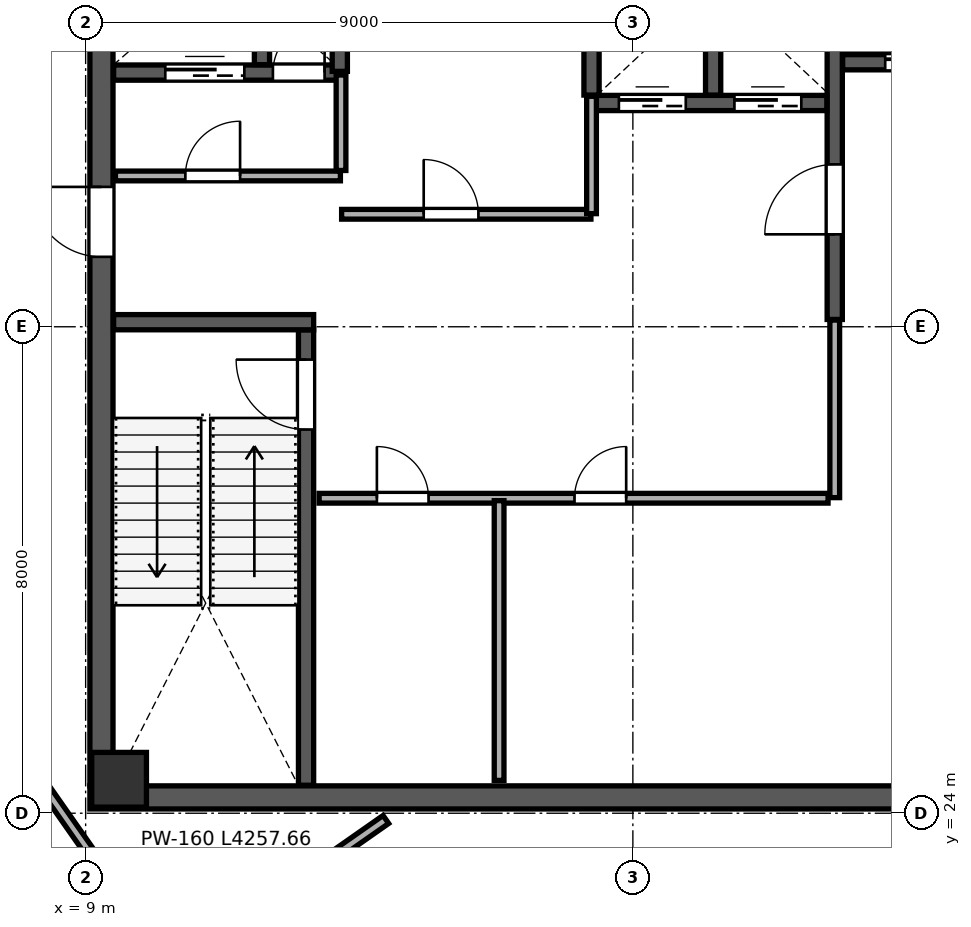
"""IFC4 building model, lengths in metres.
Left out: names, types, materials, properties, quantities, classifications, styles, units other than length and angle.
Written with IfcOpenShell. Run it as: python <this file> out.ifc"""

import sys

from ifc_helpers import new_model, si_unit, direction, frame, frame_2d, origin, origin_2d, place, context, subcontext, project, spatial, rectangle, extrude, source, transform, mapped, element, fill, save


model = new_model("IFC4")
c1 = context("Model", 3, precision=1e-05, world=origin(), true_north=direction((0.0, 1.0)))
c2 = subcontext(c1, "Body", "Model", "MODEL_VIEW")
j1 = project(units=[si_unit("LENGTHUNIT", "METRE"), si_unit("PLANEANGLEUNIT", "RADIAN")], contexts=[c1])
p1 = place(None, origin())
s1 = spatial("IfcSite", under=j1, at=p1, CompositionType="ELEMENT")
p2 = place(p1, origin())
s2 = spatial("IfcBuilding", under=s1, at=p2, CompositionType="ELEMENT")
p3 = place(p2, frame((0.0, 0.0, 298.8)))
s3 = spatial("IfcBuildingStorey", under=s2, at=p3, CompositionType="ELEMENT", Elevation=298.8)
m1 = source(origin(), c2, "Body", "SweptSolid", [
    extrude(rectangle(XDim=0.9, YDim=0.9, at=origin_2d()), origin(), (0.0, 0.0, 1.0), 4.198),
])
p4 = place(p3, frame((9.55, 24.55, 0.001), z_axis=(0.0, 0.0, 1.0), x_axis=(1.0, 0.0, 0.0)))
e1 = element("IfcColumn", 1, at=p4, inside=s3, PredefinedType="COLUMN", context=c2, shape_type="MappedRepresentation", body=[
    mapped(m1, transform((0.0, 0.0, 0.0), scale=1.0)),
])
p5 = place(p3, frame((9.26, 24.45, 0.0), z_axis=(0.0, 0.0, 1.0), x_axis=(0.0, 1.0, 0.0)))
e2 = element("IfcWall", 2, at=p5, inside=s3, PredefinedType="SHEAR", context=c2, shape_type="SweptSolid", body=[
    extrude(rectangle(XDim=15.1, YDim=0.38, at=frame_2d((7.55, 0.0))), origin(), (0.0, 0.0, 1.0), 3.96),
])
p6 = place(p5, frame((8.7, 0.0, 0.0)))
e3 = element("IfcOpeningElement", 3, at=p6, cuts=e2, PredefinedType="OPENING", context=c2, shape_type="SweptSolid", body=[
    extrude(rectangle(XDim=1.15, YDim=2.2, at=frame_2d((0.575, 1.1))), frame((0.0, 0.2, 0.0), z_axis=(0.0, -1.0, 0.0), x_axis=(1.0, 0.0, 0.0)), (0.0, 0.0, 1.0), 0.4),
])
p7 = place(p3, frame((9.07, 24.26, 0.0), z_axis=(0.0, 0.0, 1.0), x_axis=(1.0, 0.0, 0.0)))
e4 = element("IfcWall", 4, at=p7, inside=s3, PredefinedType="SHEAR", context=c2, shape_type="SweptSolid", body=[
    extrude(rectangle(XDim=17.86, YDim=0.38, at=frame_2d((8.93, 0.0))), origin(), (0.0, 0.0, 1.0), 3.96),
])
p8 = place(p3, frame((12.625, 24.46, 0.0), z_axis=(0.0, 0.0, 1.0), x_axis=(0.0, 1.0, 0.0)))
e5 = element("IfcWall", 5, at=p8, inside=s3, PredefinedType="SHEAR", context=c2, shape_type="SweptSolid", body=[
    extrude(rectangle(XDim=7.49, YDim=0.25, at=frame_2d((3.745, 0.0))), origin(), (0.0, 0.0, 1.0), 3.96),
])
p9 = place(p8, frame((5.85, 0.0, 0.0)))
e6 = element("IfcOpeningElement", 6, at=p9, cuts=e5, PredefinedType="OPENING", context=c2, shape_type="SweptSolid", body=[
    extrude(rectangle(XDim=1.15, YDim=2.2, at=frame_2d((0.575, 1.1))), frame((0.0, 0.135, 0.0), z_axis=(0.0, -1.0, 0.0), x_axis=(1.0, 0.0, 0.0)), (0.0, 0.0, 1.0), 0.27),
])
p10 = place(p3, frame((9.46, 32.075, 0.0), z_axis=(0.0, 0.0, 1.0), x_axis=(1.0, 0.0, 0.0)))
e7 = element("IfcWall", 7, at=p10, inside=s3, PredefinedType="SHEAR", context=c2, shape_type="SweptSolid", body=[
    extrude(rectangle(XDim=3.29, YDim=0.25, at=frame_2d((1.645, 0.0))), origin(), (0.0, 0.0, 1.0), 3.96),
])
p11 = place(p3, frame((21.32, 32.12, 0.0), z_axis=(0.0, 0.0, 1.0), x_axis=(0.0, 1.0, 0.0)))
e8 = element("IfcWall", 8, at=p11, inside=s3, PredefinedType="SHEAR", context=c2, shape_type="SweptSolid", body=[
    extrude(rectangle(XDim=7.42, YDim=0.25, at=frame_2d((3.71, 0.0))), origin(), (0.0, 0.0, 1.0), 3.96),
])
p12 = place(p11, frame((1.4, 0.0, 0.0)))
e9 = element("IfcOpeningElement", 9, at=p12, cuts=e8, PredefinedType="OPENING", context=c2, shape_type="SweptSolid", body=[
    extrude(rectangle(XDim=1.15, YDim=2.2, at=frame_2d((0.575, 1.1))), frame((0.0, 0.135, 0.0), z_axis=(0.0, -1.0, 0.0), x_axis=(1.0, 0.0, 0.0)), (0.0, 0.0, 1.0), 0.27),
])
p13 = place(p3, frame((9.46, 36.18, 0.0), z_axis=(0.0, 0.0, 1.0), x_axis=(1.0, 0.0, 0.0)))
e10 = element("IfcWall", 10, at=p13, inside=s3, PredefinedType="SHEAR", context=c2, shape_type="SweptSolid", body=[
    extrude(rectangle(XDim=3.79, YDim=0.25, at=frame_2d((1.895, 0.0))), origin(), (0.0, 0.0, 1.0), 3.96),
])
p14 = place(p13, frame((2.62, 0.0, 0.0)))
e11 = element("IfcOpeningElement", 11, at=p14, cuts=e10, PredefinedType="OPENING", context=c2, shape_type="SweptSolid", body=[
    extrude(rectangle(XDim=0.85, YDim=2.1, at=frame_2d((0.425, 1.05))), frame((0.0, 0.135, 0.0), z_axis=(0.0, -1.0, 0.0), x_axis=(1.0, 0.0, 0.0)), (0.0, 0.0, 1.0), 0.27),
])
p15 = place(p13, frame((0.85, 0.0, 0.0)))
e12 = element("IfcOpeningElement", 12, at=p15, cuts=e10, PredefinedType="OPENING", context=c2, shape_type="SweptSolid", body=[
    extrude(rectangle(XDim=1.3, YDim=2.25, at=frame_2d((0.65, 1.125))), frame((0.0, 0.135, 0.0), z_axis=(0.0, -1.0, 0.0), x_axis=(1.0, 0.0, 0.0)), (0.0, 0.0, 1.0), 0.27),
])
p16 = place(p3, frame((11.9, 36.31, 0.0), z_axis=(0.0, 0.0, 1.0), x_axis=(0.0, 1.0, 0.0)))
e13 = element("IfcWall", 13, at=p16, inside=s3, PredefinedType="SHEAR", context=c2, shape_type="SweptSolid", body=[
    extrude(rectangle(XDim=3.23, YDim=0.25, at=frame_2d((1.615, 0.0))), origin(), (0.0, 0.0, 1.0), 3.96),
])
p17 = place(p3, frame((21.45, 36.35, 0.0), z_axis=(0.0, 0.0, 1.0), x_axis=(1.0, 0.0, 0.0)))
e14 = element("IfcWall", 14, at=p17, inside=s3, PredefinedType="SHEAR", context=c2, shape_type="SweptSolid", body=[
    extrude(rectangle(XDim=5.09, YDim=0.25, at=frame_2d((2.545, 0.0))), origin(), (0.0, 0.0, 1.0), 3.96),
])
p18 = place(p17, frame((0.7, 0.0, 0.0)))
e15 = element("IfcOpeningElement", 15, at=p18, cuts=e14, PredefinedType="OPENING", context=c2, shape_type="SweptSolid", body=[
    extrude(rectangle(XDim=1.2, YDim=2.2, at=frame_2d((0.6, 1.1))), frame((0.0, 0.135, 0.0), z_axis=(0.0, -1.0, 0.0), x_axis=(1.0, 0.0, 0.0)), (0.0, 0.0, 1.0), 0.27),
])
p19 = place(p17, frame((3.25, 0.0, 0.0)))
e16 = element("IfcOpeningElement", 16, at=p19, cuts=e14, PredefinedType="OPENING", context=c2, shape_type="SweptSolid", body=[
    extrude(rectangle(XDim=1.2, YDim=2.2, at=frame_2d((0.6, 1.1))), frame((0.0, 0.135, 0.0), z_axis=(0.0, -1.0, 0.0), x_axis=(1.0, 0.0, 0.0)), (0.0, 0.0, 1.0), 0.27),
])
p20 = place(p3, frame((13.18, 36.2, 0.0), z_axis=(0.0, 0.0, 1.0), x_axis=(0.0, 1.0, 0.0)))
e17 = element("IfcWall", 17, at=p20, inside=s3, PredefinedType="SHEAR", context=c2, shape_type="SweptSolid", body=[
    extrude(rectangle(XDim=3.34, YDim=0.25, at=frame_2d((1.67, 0.0))), origin(), (0.0, 0.0, 1.0), 3.96),
])
p21 = place(p3, frame((17.32, 35.68, 0.0), z_axis=(0.0, 0.0, 1.0), x_axis=(1.0, 0.0, 0.0)))
e18 = element("IfcWall", 18, at=p21, inside=s3, PredefinedType="SHEAR", context=c2, shape_type="SweptSolid", body=[
    extrude(rectangle(XDim=3.87, YDim=0.25, at=frame_2d((1.935, 0.0))), origin(), (0.0, 0.0, 1.0), 3.96),
])
p22 = place(p21, frame((0.45, 0.0, 0.0)))
e19 = element("IfcOpeningElement", 19, at=p22, cuts=e18, PredefinedType="OPENING", context=c2, shape_type="SweptSolid", body=[
    extrude(rectangle(XDim=1.1, YDim=2.2, at=frame_2d((0.55, 1.1))), frame((0.0, 0.135, 0.0), z_axis=(0.0, -1.0, 0.0), x_axis=(1.0, 0.0, 0.0)), (0.0, 0.0, 1.0), 0.27),
])
p23 = place(p21, frame((2.35, 0.0, 0.0)))
e20 = element("IfcOpeningElement", 20, at=p23, cuts=e18, PredefinedType="OPENING", context=c2, shape_type="SweptSolid", body=[
    extrude(rectangle(XDim=1.1, YDim=2.2, at=frame_2d((0.55, 1.1))), frame((0.0, 0.135, 0.0), z_axis=(0.0, -1.0, 0.0), x_axis=(1.0, 0.0, 0.0)), (0.0, 0.0, 1.0), 0.27),
])
for number, where, z_axis, x_axis in (
    (21, (17.32, 35.81, 0.0), (0.0, 0.0, 1.0), (0.0, 1.0, 0.0)),
    (22, (19.32, 35.81, 0.0), (0.0, 0.0, 1.0), (0.0, 1.0, 0.0)),
):
    element("IfcWall", number, at=place(p3, frame(where, z_axis=z_axis, x_axis=x_axis)), inside=s3, PredefinedType="SHEAR", context=c2, shape_type="SweptSolid", body=[
        extrude(rectangle(XDim=3.73, YDim=0.25, at=frame_2d((1.865, 0.0))), origin(), (0.0, 0.0, 1.0), 3.96),
    ])
p24 = place(p3, frame((9.49, 34.48, 0.0), z_axis=(0.0, 0.0, 1.0), x_axis=(1.0, 0.0, 0.0)))
e23 = element("IfcWall", 23, at=p24, inside=s3, PredefinedType="PARTITIONING", context=c2, shape_type="SweptSolid", body=[
    extrude(rectangle(XDim=3.7, YDim=0.16, at=frame_2d((1.85, 0.0))), origin(), (0.0, 0.0, 1.0), 3.96),
])
p25 = place(p24, frame((1.15, 0.0, 0.0)))
e24 = element("IfcOpeningElement", 24, at=p25, cuts=e23, PredefinedType="OPENING", context=c2, shape_type="SweptSolid", body=[
    extrude(rectangle(XDim=0.9, YDim=2.15, at=frame_2d((0.45, 1.075))), frame((0.0, 0.09, 0.0), z_axis=(0.0, -1.0, 0.0), x_axis=(1.0, 0.0, 0.0)), (0.0, 0.0, 1.0), 0.18),
])
p26 = place(p3, frame((13.2, 34.57, 0.0), z_axis=(0.0, 0.0, 1.0), x_axis=(0.0, 1.0, 0.0)))
e25 = element("IfcWall", 25, at=p26, inside=s3, PredefinedType="PARTITIONING", context=c2, shape_type="SweptSolid", body=[
    extrude(rectangle(XDim=1.57, YDim=0.16, at=frame_2d((0.785, 0.0))), origin(), (0.0, 0.0, 1.0), 3.96),
])
p27 = place(p3, frame((13.21, 33.85, 0.0), z_axis=(0.0, 0.0, 1.0), x_axis=(1.0, 0.0, 0.0)))
e26 = element("IfcWall", 26, at=p27, inside=s3, PredefinedType="PARTITIONING", context=c2, shape_type="SweptSolid", body=[
    extrude(rectangle(XDim=4.1, YDim=0.16, at=frame_2d((2.05, 0.0))), origin(), (0.0, 0.0, 1.0), 3.96),
])
p28 = place(p27, frame((1.35, 0.0, 0.0)))
e27 = element("IfcOpeningElement", 27, at=p28, cuts=e26, PredefinedType="OPENING", context=c2, shape_type="SweptSolid", body=[
    extrude(rectangle(XDim=0.9, YDim=2.15, at=frame_2d((0.45, 1.075))), frame((0.0, 0.09, 0.0), z_axis=(0.0, -1.0, 0.0), x_axis=(1.0, 0.0, 0.0)), (0.0, 0.0, 1.0), 0.18),
])
p29 = place(p3, frame((17.32, 33.86, 0.0), z_axis=(0.0, 0.0, 1.0), x_axis=(0.0, 1.0, 0.0)))
e28 = element("IfcWall", 28, at=p29, inside=s3, PredefinedType="PARTITIONING", context=c2, shape_type="SweptSolid", body=[
    extrude(rectangle(XDim=1.93, YDim=0.16, at=frame_2d((0.965, 0.0))), origin(), (0.0, 0.0, 1.0), 3.96),
])
p30 = place(p3, frame((12.84, 29.18, 0.0), z_axis=(0.0, 0.0, 1.0), x_axis=(1.0, 0.0, 0.0)))
e29 = element("IfcWall", 29, at=p30, inside=s3, PredefinedType="PARTITIONING", context=c2, shape_type="SweptSolid", body=[
    extrude(rectangle(XDim=8.37, YDim=0.16, at=frame_2d((4.185, 0.0))), origin(), (0.0, 0.0, 1.0), 3.96),
])
p31 = place(p30, frame((0.95, 0.0, 0.0)))
e30 = element("IfcOpeningElement", 30, at=p31, cuts=e29, PredefinedType="OPENING", context=c2, shape_type="SweptSolid", body=[
    extrude(rectangle(XDim=0.85, YDim=2.1, at=frame_2d((0.425, 1.05))), frame((0.0, 0.09, 0.0), z_axis=(0.0, -1.0, 0.0), x_axis=(1.0, 0.0, 0.0)), (0.0, 0.0, 1.0), 0.18),
])
p32 = place(p30, frame((4.2, 0.0, 0.0)))
e31 = element("IfcOpeningElement", 31, at=p32, cuts=e29, PredefinedType="OPENING", context=c2, shape_type="SweptSolid", body=[
    extrude(rectangle(XDim=0.85, YDim=2.1, at=frame_2d((0.425, 1.05))), frame((0.0, 0.09, 0.0), z_axis=(0.0, -1.0, 0.0), x_axis=(1.0, 0.0, 0.0)), (0.0, 0.0, 1.0), 0.18),
])
p33 = place(p3, frame((15.8, 24.54, 0.0), z_axis=(0.0, 0.0, 1.0), x_axis=(0.0, 1.0, 0.0)))
e32 = element("IfcWall", 32, at=p33, inside=s3, PredefinedType="PARTITIONING", context=c2, shape_type="SweptSolid", body=[
    extrude(rectangle(XDim=4.6, YDim=0.16, at=frame_2d((2.3, 0.0))), origin(), (0.0, 0.0, 1.0), 3.96),
])
p34 = place(p3, frame((21.32, 29.19, 0.0), z_axis=(0.0, 0.0, 1.0), x_axis=(0.0, 1.0, 0.0)))
e33 = element("IfcWall", 33, at=p34, inside=s3, PredefinedType="PARTITIONING", context=c2, shape_type="SweptSolid", body=[
    extrude(rectangle(XDim=2.92, YDim=0.16, at=frame_2d((1.46, 0.0))), origin(), (0.0, 0.0, 1.0), 3.96),
])
p35 = place(p3, frame((3.758, 30.942, 0.0), z_axis=(0.0, 0.0, 1.0), x_axis=(0.573575634469, -0.819152605772, 0.0)))
e34 = element("IfcWall", 34, at=p35, inside=s3, PredefinedType="PARTITIONING", context=c2, shape_type="SweptSolid", body=[
    extrude(rectangle(XDim=11.57, YDim=0.16, at=frame_2d((5.785, 0.0))), origin(), (0.0, 0.0, 1.0), 3.96),
])
p36 = place(p35, frame((1.15, 0.0, 0.0)))
e35 = element("IfcOpeningElement", 35, at=p36, cuts=e34, PredefinedType="OPENING", context=c2, shape_type="SweptSolid", body=[
    extrude(rectangle(XDim=0.95, YDim=2.15, at=frame_2d((0.475, 1.075))), frame((0.0, 0.09, 0.0), z_axis=(0.0, -1.0, 0.0), x_axis=(1.0, 0.0, 0.0)), (0.0, 0.0, 1.0), 0.18),
])
p37 = place(p3, frame((10.45, 21.455, 0.0), z_axis=(0.0, 0.0, 1.0), x_axis=(0.819110678768, 0.573635507903, 0.0)))
e36 = element("IfcWall", 36, at=p37, inside=s3, PredefinedType="PARTITIONING", context=c2, shape_type="SweptSolid", body=[
    extrude(rectangle(XDim=4.258, YDim=0.16, at=frame_2d((2.129, 0.0))), origin(), (0.0, 0.0, 1.0), 3.96),
])
p38 = place(p3, frame((21.918, 49.884, 0.0), z_axis=(0.0, 0.0, 1.0), x_axis=(0.57358495776, -0.819146077468, 0.0)))
e37 = element("IfcWall", 37, at=p38, inside=s3, PredefinedType="PARTITIONING", context=c2, shape_type="SweptSolid", body=[
    extrude(rectangle(XDim=25.79, YDim=0.1, at=frame_2d((12.895, 0.0))), origin(), (0.0, 0.0, 1.0), 3.96),
])
p39 = place(p38, frame((9.2, 0.0, 0.0)))
e38 = element("IfcOpeningElement", 38, at=p39, cuts=e37, PredefinedType="OPENING", context=c2, shape_type="SweptSolid", body=[
    extrude(rectangle(XDim=0.95, YDim=2.15, at=frame_2d((0.475, 1.075))), frame((0.0, 0.06, 0.0), z_axis=(0.0, -1.0, 0.0), x_axis=(1.0, 0.0, 0.0)), (0.0, 0.0, 1.0), 0.12),
])
p40 = place(p3, frame((2.071, 36.036, 0.0), z_axis=(0.0, 0.0, 1.0), x_axis=(0.819154854942, 0.573572422302, 0.0)))
e39 = element("IfcWall", 39, at=p40, inside=s3, PredefinedType="PARTITIONING", context=c2, shape_type="SweptSolid", body=[
    extrude(rectangle(XDim=29.62, YDim=0.115, at=frame_2d((14.81, 0.0))), origin(), (0.0, 0.0, 1.0), 3.96),
])
p41 = place(p40, frame((4.2, 0.0, 0.0)))
e40 = element("IfcOpeningElement", 40, at=p41, cuts=e39, PredefinedType="OPENING", context=c2, shape_type="SweptSolid", body=[
    extrude(rectangle(XDim=0.95, YDim=2.15, at=frame_2d((0.475, 1.075))), frame((0.0, 0.067, 0.0), z_axis=(0.0, -1.0, 0.0), x_axis=(1.0, 0.0, 0.0)), (0.0, 0.0, 1.0), 0.135),
])
m2 = source(origin(), c2, "Body", "SweptSolid", [
    extrude(rectangle(XDim=1.15, YDim=2.2, at=frame_2d((0.575, 1.1))), frame((0.0, 0.025, 0.0), z_axis=(0.0, -1.0, 0.0), x_axis=(1.0, 0.0, 0.0)), (0.0, 0.0, 1.0), 0.05),
])
p42 = place(p9, origin())
e41 = element("IfcDoor", 41, at=p42, inside=s3, OperationType="SINGLE_SWING_RIGHT", PredefinedType="DOOR", context=c2, shape_type="MappedRepresentation", body=[
    mapped(m2, transform((0.0, 0.0, 0.0), scale=1.0)),
])
fill(e6, e41)
m3 = source(origin(), c2, "Body", "SweptSolid", [
    extrude(rectangle(XDim=1.15, YDim=2.2, at=frame_2d((0.575, 1.1))), frame((0.0, 0.025, 0.0), z_axis=(0.0, -1.0, 0.0), x_axis=(1.0, 0.0, 0.0)), (0.0, 0.0, 1.0), 0.05),
])
p43 = place(p12, origin())
e42 = element("IfcDoor", 42, at=p43, inside=s3, OperationType="SINGLE_SWING_LEFT", PredefinedType="DOOR", context=c2, shape_type="MappedRepresentation", body=[
    mapped(m3, transform((0.0, 0.0, 0.0), scale=1.0)),
])
fill(e9, e42)
p44 = place(p6, origin())
e43 = element("IfcDoor", 43, at=p44, inside=s3, OperationType="SINGLE_SWING_RIGHT", PredefinedType="DOOR", context=c2, shape_type="MappedRepresentation", body=[
    mapped(m3, transform((0.0, 0.0, 0.0), scale=1.0)),
])
fill(e3, e43)
m4 = source(origin(), c2, "Body", "SweptSolid", [
    extrude(rectangle(XDim=0.85, YDim=2.1, at=frame_2d((0.425, 1.05))), frame((0.0, 0.025, 0.0), z_axis=(0.0, -1.0, 0.0), x_axis=(1.0, 0.0, 0.0)), (0.0, 0.0, 1.0), 0.05),
])
p45 = place(p14, origin())
e44 = element("IfcDoor", 44, at=p45, inside=s3, OperationType="SINGLE_SWING_RIGHT", PredefinedType="DOOR", context=c2, shape_type="MappedRepresentation", body=[
    mapped(m4, transform((0.0, 0.0, 0.0), scale=1.0)),
])
fill(e11, e44)
m5 = source(origin(), c2, "Body", "SweptSolid", [
    extrude(rectangle(XDim=1.1, YDim=2.2, at=frame_2d((0.55, 1.1))), frame((0.0, 0.025, 0.0), z_axis=(0.0, -1.0, 0.0), x_axis=(1.0, 0.0, 0.0)), (0.0, 0.0, 1.0), 0.05),
])
p46 = place(p22, origin())
e45 = element("IfcDoor", 45, at=p46, inside=s3, OperationType="SLIDING_TO_LEFT", PredefinedType="DOOR", context=c2, shape_type="MappedRepresentation", body=[
    mapped(m5, transform((0.0, 0.0, 0.0), scale=1.0)),
])
fill(e19, e45)
p47 = place(p23, origin())
e46 = element("IfcDoor", 46, at=p47, inside=s3, OperationType="SLIDING_TO_RIGHT", PredefinedType="DOOR", context=c2, shape_type="MappedRepresentation", body=[
    mapped(m5, transform((0.0, 0.0, 0.0), scale=1.0)),
])
fill(e20, e46)
m6 = source(origin(), c2, "Body", "SweptSolid", [
    extrude(rectangle(XDim=1.2, YDim=2.2, at=frame_2d((0.6, 1.1))), frame((0.0, 0.025, 0.0), z_axis=(0.0, -1.0, 0.0), x_axis=(1.0, 0.0, 0.0)), (0.0, 0.0, 1.0), 0.05),
])
p48 = place(p18, origin())
e47 = element("IfcDoor", 47, at=p48, inside=s3, OperationType="SLIDING_TO_LEFT", PredefinedType="DOOR", context=c2, shape_type="MappedRepresentation", body=[
    mapped(m6, transform((0.0, 0.0, 0.0), scale=1.0)),
])
fill(e15, e47)
m7 = source(origin(), c2, "Body", "SweptSolid", [
    extrude(rectangle(XDim=1.3, YDim=2.25, at=frame_2d((0.65, 1.125))), frame((0.0, 0.025, 0.0), z_axis=(0.0, -1.0, 0.0), x_axis=(1.0, 0.0, 0.0)), (0.0, 0.0, 1.0), 0.05),
])
p49 = place(p15, origin())
e48 = element("IfcDoor", 48, at=p49, inside=s3, OperationType="SLIDING_TO_LEFT", PredefinedType="DOOR", context=c2, shape_type="MappedRepresentation", body=[
    mapped(m7, transform((0.0, 0.0, 0.0), scale=1.0)),
])
fill(e12, e48)
m8 = source(origin(), c2, "Body", "SweptSolid", [
    extrude(rectangle(XDim=0.9, YDim=2.15, at=frame_2d((0.45, 1.075))), frame((0.0, 0.025, 0.0), z_axis=(0.0, -1.0, 0.0), x_axis=(1.0, 0.0, 0.0)), (0.0, 0.0, 1.0), 0.05),
])
p50 = place(p25, origin())
e49 = element("IfcDoor", 49, at=p50, inside=s3, OperationType="SINGLE_SWING_RIGHT", PredefinedType="DOOR", context=c2, shape_type="MappedRepresentation", body=[
    mapped(m8, transform((0.0, 0.0, 0.0), scale=1.0)),
])
fill(e24, e49)
p51 = place(p28, origin())
e50 = element("IfcDoor", 50, at=p51, inside=s3, OperationType="SINGLE_SWING_LEFT", PredefinedType="DOOR", context=c2, shape_type="MappedRepresentation", body=[
    mapped(m8, transform((0.0, 0.0, 0.0), scale=1.0)),
])
fill(e27, e50)
p52 = place(p31, origin())
e51 = element("IfcDoor", 51, at=p52, inside=s3, OperationType="SINGLE_SWING_LEFT", PredefinedType="DOOR", context=c2, shape_type="MappedRepresentation", body=[
    mapped(m4, transform((0.0, 0.0, 0.0), scale=1.0)),
])
fill(e30, e51)
p53 = place(p32, origin())
e52 = element("IfcDoor", 52, at=p53, inside=s3, OperationType="SINGLE_SWING_RIGHT", PredefinedType="DOOR", context=c2, shape_type="MappedRepresentation", body=[
    mapped(m4, transform((0.0, 0.0, 0.0), scale=1.0)),
])
fill(e31, e52)
save(model, sys.argv[1])
